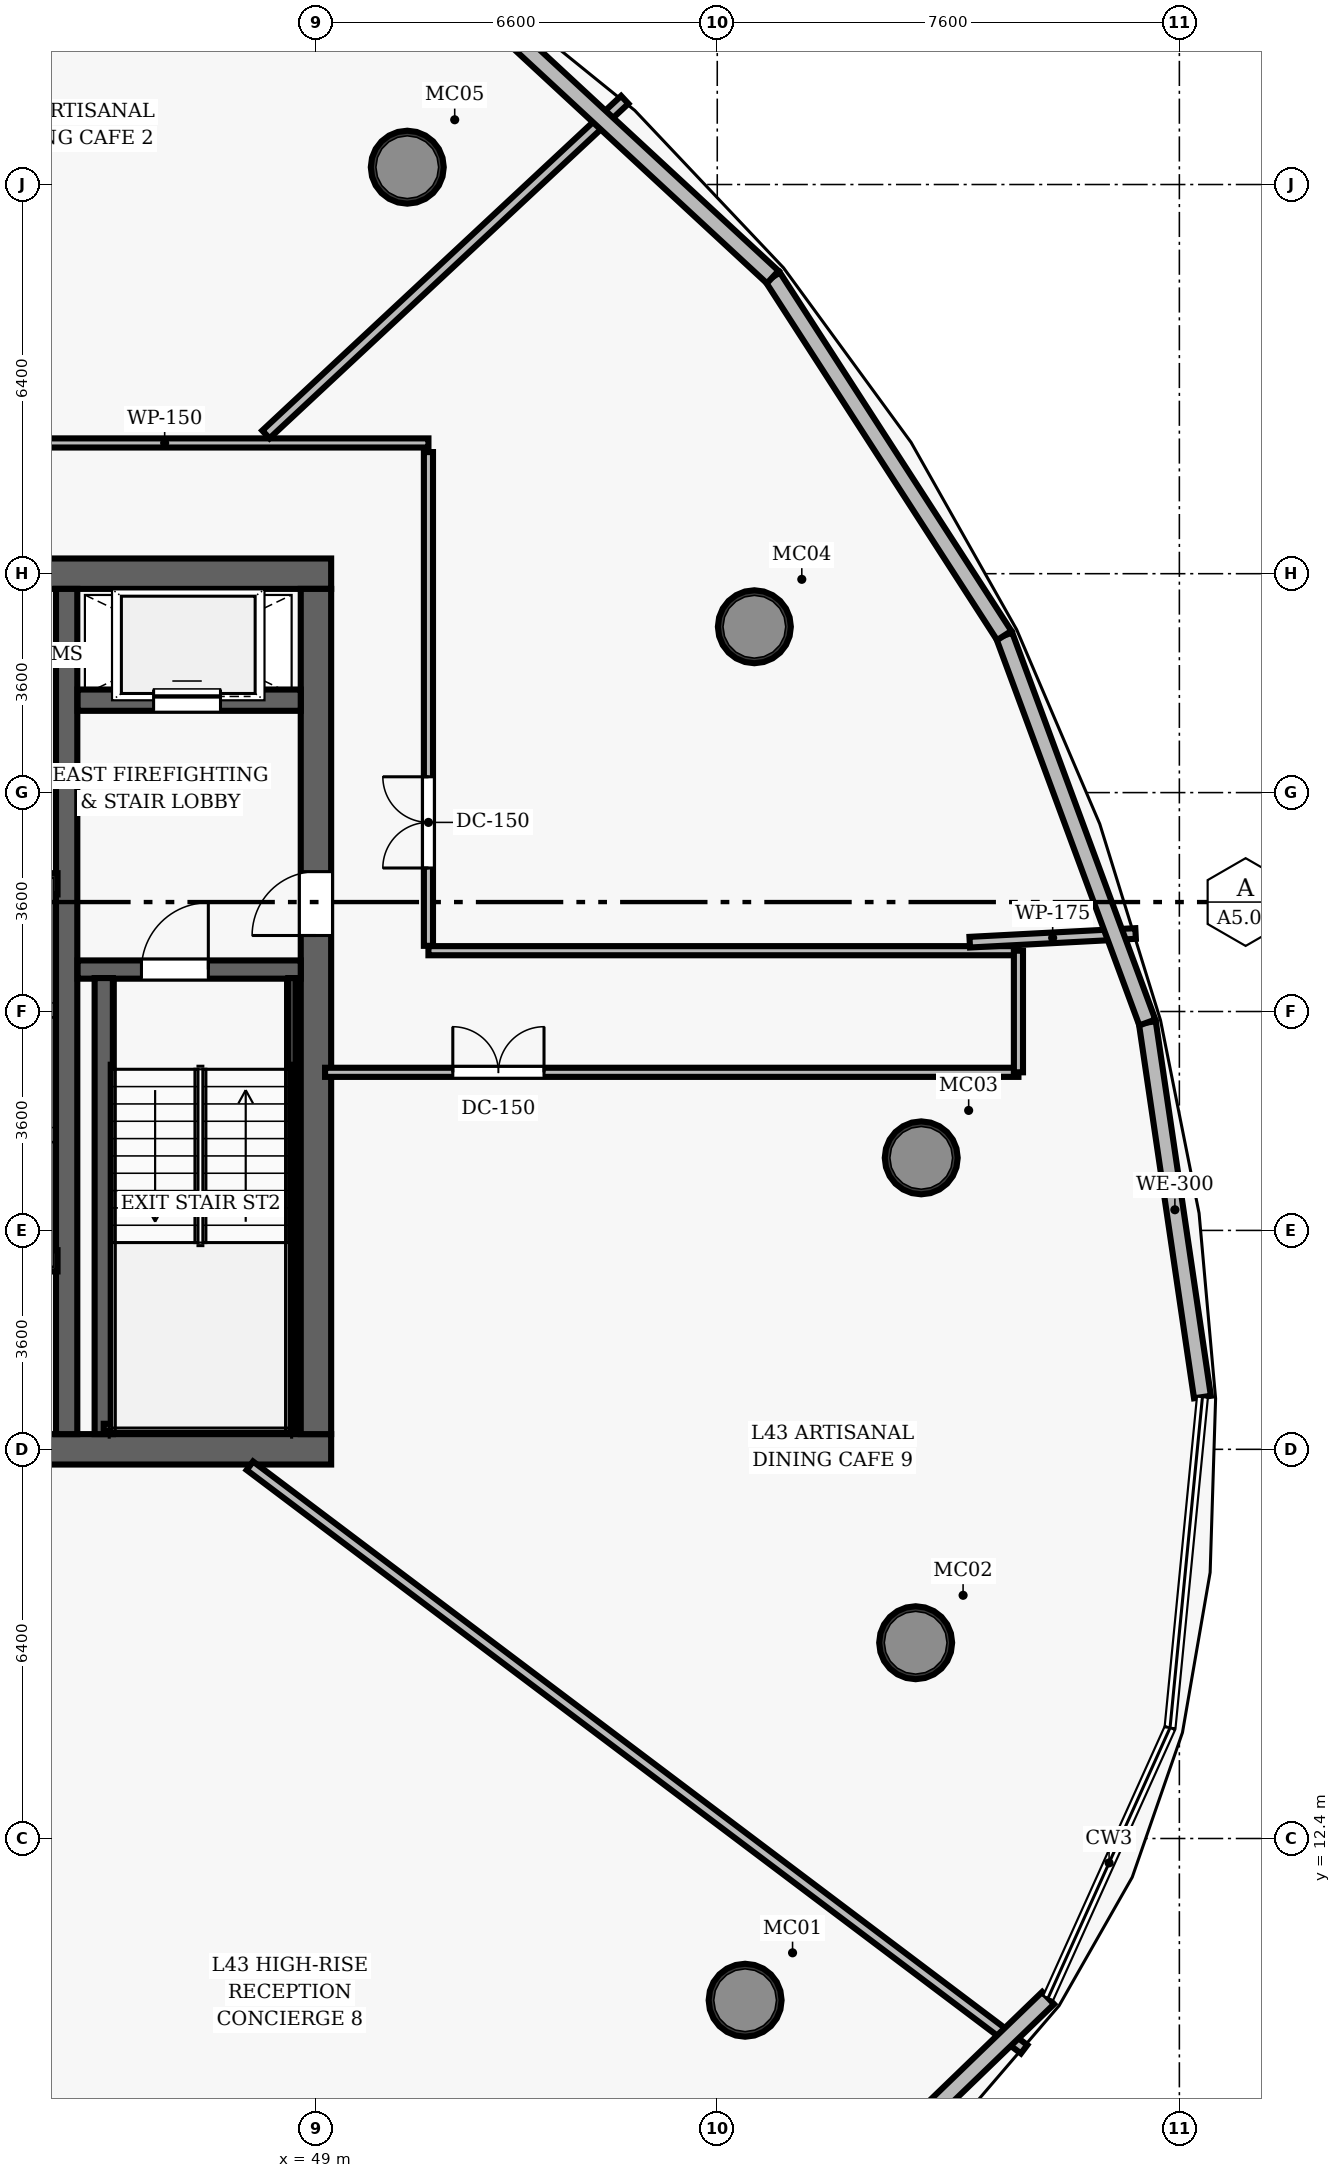
"""IFC4 building model, lengths in metres.
Left out: names, types, materials, properties, quantities, classifications, styles, units other than length and angle.
Written with IfcOpenShell. Run it as: python <this file> out.ifc"""

import sys

from ifc_helpers import new_model, si_unit, direction, frame, frame_2d, origin, origin_2d, place, context, subcontext, project, spatial, rectangle, hollow_circle, extrude, element, fill, save


model = new_model("IFC4")
c1 = context("Model", 3, precision=1e-05, world=origin(), true_north=direction((0.0, 1.0)))
c2 = subcontext(c1, "Body", "Model", "MODEL_VIEW")
j1 = project(units=[si_unit("LENGTHUNIT", "METRE"), si_unit("PLANEANGLEUNIT", "RADIAN")], contexts=[c1])
p1 = place(None, origin())
s1 = spatial("IfcSite", under=j1, at=p1, CompositionType="ELEMENT")
p2 = place(p1, origin())
s2 = spatial("IfcBuilding", under=s1, at=p2, CompositionType="ELEMENT")
p3 = place(p2, frame((0.0, 0.0, 171.2)))
s3 = spatial("IfcBuildingStorey", under=s2, at=p3, CompositionType="ELEMENT", Elevation=171.2)
p4 = place(p3, frame((26.75, 18.8, 0.0), z_axis=(0.0, 0.0, 1.0), x_axis=(1.0, 0.0, 0.0)))
e1 = element("IfcWall", 1, at=p4, inside=s3, PredefinedType="SHEAR", context=c2, shape_type="SweptSolid", body=[
    extrude(rectangle(XDim=22.5, YDim=0.5, at=frame_2d((11.25, 0.0))), origin(), (0.0, 0.0, 1.0), 3.85),
])
p5 = place(p4, frame((14.47, 0.0, 0.0)))
e2 = element("IfcOpeningElement", 2, at=p5, cuts=e1, PredefinedType="OPENING", context=c2, shape_type="SweptSolid", body=[
    extrude(rectangle(XDim=1.05, YDim=2.15, at=frame_2d((0.525, 1.075))), frame((0.0, 0.26, 0.0), z_axis=(0.0, -1.0, 0.0), x_axis=(1.0, 0.0, 0.0)), (0.0, 0.0, 1.0), 0.52),
])
p6 = place(p3, frame((26.75, 33.2, 0.0), z_axis=(0.0, 0.0, 1.0), x_axis=(1.0, 0.0, 0.0)))
e3 = element("IfcWall", 3, at=p6, inside=s3, PredefinedType="SHEAR", context=c2, shape_type="SweptSolid", body=[
    extrude(rectangle(XDim=22.5, YDim=0.5, at=frame_2d((11.25, 0.0))), origin(), (0.0, 0.0, 1.0), 3.85),
])
p7 = place(p6, frame((4.57, 0.0, 0.0)))
e4 = element("IfcOpeningElement", 4, at=p7, cuts=e3, PredefinedType="OPENING", context=c2, shape_type="SweptSolid", body=[
    extrude(rectangle(XDim=1.05, YDim=2.15, at=frame_2d((0.525, 1.075))), frame((0.0, 0.26, 0.0), z_axis=(0.0, -1.0, 0.0), x_axis=(1.0, 0.0, 0.0)), (0.0, 0.0, 1.0), 0.52),
])
p8 = place(p6, frame((14.47, 0.0, 0.0)))
e5 = element("IfcOpeningElement", 5, at=p8, cuts=e3, PredefinedType="OPENING", context=c2, shape_type="SweptSolid", body=[
    extrude(rectangle(XDim=1.05, YDim=2.15, at=frame_2d((0.525, 1.075))), frame((0.0, 0.26, 0.0), z_axis=(0.0, -1.0, 0.0), x_axis=(1.0, 0.0, 0.0)), (0.0, 0.0, 1.0), 0.52),
])
p9 = place(p3, frame((49.0, 19.05, 0.0), z_axis=(0.0, 0.0, 1.0), x_axis=(0.0, 1.0, 0.0)))
e6 = element("IfcWall", 6, at=p9, inside=s3, PredefinedType="SHEAR", context=c2, shape_type="SweptSolid", body=[
    extrude(rectangle(XDim=13.9, YDim=0.5, at=frame_2d((6.95, 0.0))), origin(), (0.0, 0.0, 1.0), 3.85),
])
p10 = place(p9, frame((8.2, 0.0, 0.0)))
e7 = element("IfcOpeningElement", 7, at=p10, cuts=e6, PredefinedType="OPENING", context=c2, shape_type="SweptSolid", body=[
    extrude(rectangle(XDim=1.05, YDim=2.15, at=frame_2d((0.525, 1.075))), frame((0.0, 0.26, 0.0), z_axis=(0.0, -1.0, 0.0), x_axis=(1.0, 0.0, 0.0)), (0.0, 0.0, 1.0), 0.52),
])
p11 = place(p3, frame((44.9, 19.05, 0.0), z_axis=(0.0, 0.0, 1.0), x_axis=(0.0, 1.0, 0.0)))
e8 = element("IfcWall", 8, at=p11, inside=s3, PredefinedType="SHEAR", context=c2, shape_type="SweptSolid", body=[
    extrude(rectangle(XDim=13.9, YDim=0.35, at=frame_2d((6.95, 0.0))), origin(), (0.0, 0.0, 1.0), 3.85),
])
for number, where, z_axis, x_axis in (
    (9, (56.058, 9.74, 0.0), (0.0, 0.0, 1.0), (1.0, 0.0, 0.0)),
    (10, (58.863, 15.619, 0.0), (0.0, 0.0, 1.0), (1.0, 0.0, 0.0)),
    (11, (58.955, 23.594, 0.0), (0.0, 0.0, 1.0), (1.0, 0.0, 0.0)),
    (12, (56.21, 32.327, 0.0), (0.0, 0.0, 1.0), (1.0, 0.0, 0.0)),
    (13, (50.502, 39.885, 0.0), (0.0, 0.0, 1.0), (1.0, 0.0, 0.0)),
):
    element("IfcColumn", number, at=place(p3, frame(where, z_axis=z_axis, x_axis=x_axis)), inside=s3, PredefinedType="COLUMN", context=c2, shape_type="SweptSolid", body=[
        extrude(hollow_circle(Radius=0.6, WallThickness=0.05, at=origin_2d()), origin(), (0.0, 0.0, 1.0), 3.85),
    ])
p12 = place(p3, frame((45.08, 26.69, 0.0), z_axis=(0.0, 0.0, 1.0), x_axis=(1.0, 0.0, 0.0)))
e14 = element("IfcWall", 14, at=p12, inside=s3, PredefinedType="SHEAR", context=c2, shape_type="SweptSolid", body=[
    extrude(rectangle(XDim=3.67, YDim=0.3, at=frame_2d((1.835, 0.0))), origin(), (0.0, 0.0, 1.0), 3.85),
])
p13 = place(p12, frame((1.05, 0.0, 0.0)))
e15 = element("IfcOpeningElement", 15, at=p13, cuts=e14, PredefinedType="OPENING", context=c2, shape_type="SweptSolid", body=[
    extrude(rectangle(XDim=1.1, YDim=2.15, at=frame_2d((0.55, 1.075))), frame((0.0, 0.16, 0.0), z_axis=(0.0, -1.0, 0.0), x_axis=(1.0, 0.0, 0.0)), (0.0, 0.0, 1.0), 0.32),
])
p14 = place(p3, frame((45.51, 19.05, 0.0), z_axis=(0.0, 0.0, 1.0), x_axis=(0.0, 1.0, 0.0)))
e16 = element("IfcWall", 16, at=p14, inside=s3, PredefinedType="SHEAR", context=c2, shape_type="SweptSolid", body=[
    extrude(rectangle(XDim=7.5, YDim=0.3, at=frame_2d((3.75, 0.0))), origin(), (0.0, 0.0, 1.0), 3.85),
])
p15 = place(p3, frame((48.605, 19.1, 0.0), z_axis=(0.0, 0.0, 1.0), x_axis=(0.0, 1.0, 0.0)))
e17 = element("IfcWall", 17, at=p15, inside=s3, PredefinedType="SHEAR", context=c2, shape_type="SweptSolid", body=[
    extrude(rectangle(XDim=7.45, YDim=0.12, at=frame_2d((3.725, 0.0))), origin(), (0.0, 0.0, 1.0), 3.85),
])
p16 = place(p3, frame((45.51, 19.16, 0.0), z_axis=(0.0, 0.0, 1.0), x_axis=(1.0, 0.0, 0.0)))
e18 = element("IfcWall", 18, at=p16, inside=s3, PredefinedType="SHEAR", context=c2, shape_type="SweptSolid", body=[
    extrude(rectangle(XDim=3.095, YDim=0.12, at=frame_2d((1.547, 0.0))), origin(), (0.0, 0.0, 1.0), 3.85),
])
p17 = place(p3, frame((45.08, 31.12, 0.0), z_axis=(0.0, 0.0, 1.0), x_axis=(1.0, 0.0, 0.0)))
e19 = element("IfcWall", 19, at=p17, inside=s3, PredefinedType="SHEAR", context=c2, shape_type="SweptSolid", body=[
    extrude(rectangle(XDim=3.67, YDim=0.35, at=frame_2d((1.835, 0.0))), origin(), (0.0, 0.0, 1.0), 3.035),
])
p18 = place(p17, frame((1.25, 0.0, 0.0)))
e20 = element("IfcOpeningElement", 20, at=p18, cuts=e19, PredefinedType="OPENING", context=c2, shape_type="SweptSolid", body=[
    extrude(rectangle(XDim=1.1, YDim=2.15, at=frame_2d((0.55, 1.075))), frame((0.0, 0.185, 0.0), z_axis=(0.0, -1.0, 0.0), x_axis=(1.0, 0.0, 0.0)), (0.0, 0.0, 1.0), 0.37),
])
for number, where, z_axis, x_axis in (
    (21, (42.72, 21.9, 0.0), (0.0, 0.0, 1.0), (1.0, 0.0, 0.0)),
    (22, (42.72, 28.1, 0.0), (0.0, 0.0, 1.0), (1.0, 0.0, 0.0)),
):
    element("IfcWall", number, at=place(p3, frame(where, z_axis=z_axis, x_axis=x_axis)), inside=s3, PredefinedType="SHEAR", context=c2, shape_type="SweptSolid", body=[
        extrude(rectangle(XDim=2.03, YDim=0.35, at=frame_2d((1.015, 0.0))), origin(), (0.0, 0.0, 1.0), 3.035),
    ])
p19 = place(p3, frame((24.85, 35.35, 0.0), z_axis=(0.0, 0.0, 1.0), x_axis=(1.0, 0.0, 0.0)))
e23 = element("IfcWall", 23, at=p19, inside=s3, PredefinedType="PARTITIONING", context=c2, shape_type="SweptSolid", body=[
    extrude(rectangle(XDim=26.0, YDim=0.15, at=frame_2d((13.0, 0.0))), origin(), (0.0, 0.0, 1.0), 3.035),
])
p20 = place(p19, frame((15.674, 0.0, 0.0)))
e24 = element("IfcOpeningElement", 24, at=p20, cuts=e23, PredefinedType="OPENING", context=c2, shape_type="SweptSolid", body=[
    extrude(rectangle(XDim=1.5, YDim=2.2, at=frame_2d((0.75, 1.1))), frame((0.0, 0.085, 0.0), z_axis=(0.0, -1.0, 0.0), x_axis=(1.0, 0.0, 0.0)), (0.0, 0.0, 1.0), 0.17),
])
p21 = place(p19, frame((10.178, 0.0, 0.0)))
e25 = element("IfcOpeningElement", 25, at=p21, cuts=e23, PredefinedType="OPENING", context=c2, shape_type="SweptSolid", body=[
    extrude(rectangle(XDim=0.95, YDim=2.15, at=frame_2d((0.475, 1.075))), frame((0.0, 0.085, 0.0), z_axis=(0.0, -1.0, 0.0), x_axis=(1.0, 0.0, 0.0)), (0.0, 0.0, 1.0), 0.17),
])
p22 = place(p19, frame((4.997, 0.0, 0.0)))
e26 = element("IfcOpeningElement", 26, at=p22, cuts=e23, PredefinedType="OPENING", context=c2, shape_type="SweptSolid", body=[
    extrude(rectangle(XDim=0.95, YDim=2.15, at=frame_2d((0.475, 1.075))), frame((0.0, 0.085, 0.0), z_axis=(0.0, -1.0, 0.0), x_axis=(1.0, 0.0, 0.0)), (0.0, 0.0, 1.0), 0.17),
])
p23 = place(p3, frame((50.85, 27.08, 0.0), z_axis=(0.0, 0.0, 1.0), x_axis=(0.0, 1.0, 0.0)))
e27 = element("IfcWall", 27, at=p23, inside=s3, PredefinedType="PARTITIONING", context=c2, shape_type="SweptSolid", body=[
    extrude(rectangle(XDim=8.12, YDim=0.15, at=frame_2d((4.06, 0.0))), origin(), (0.0, 0.0, 1.0), 3.035),
])
p24 = place(p23, frame((1.28, 0.0, 0.0)))
e28 = element("IfcOpeningElement", 28, at=p24, cuts=e27, PredefinedType="OPENING", context=c2, shape_type="SweptSolid", body=[
    extrude(rectangle(XDim=1.5, YDim=2.2, at=frame_2d((0.75, 1.1))), frame((0.0, 0.085, 0.0), z_axis=(0.0, -1.0, 0.0), x_axis=(1.0, 0.0, 0.0)), (0.0, 0.0, 1.0), 0.17),
])
p25 = place(p3, frame((50.85, 27.0, 0.0), z_axis=(0.0, 0.0, 1.0), x_axis=(1.0, 0.0, 0.0)))
e29 = element("IfcWall", 29, at=p25, inside=s3, PredefinedType="PARTITIONING", context=c2, shape_type="SweptSolid", body=[
    extrude(rectangle(XDim=9.703, YDim=0.15, at=frame_2d((4.852, 0.0))), origin(), (0.0, 0.0, 1.0), 3.035),
])
p26 = place(p3, frame((49.15, 25.0, 0.0), z_axis=(0.0, 0.0, 1.0), x_axis=(1.0, 0.0, 0.0)))
e30 = element("IfcWall", 30, at=p26, inside=s3, PredefinedType="PARTITIONING", context=c2, shape_type="SweptSolid", body=[
    extrude(rectangle(XDim=11.403, YDim=0.15, at=frame_2d((5.702, 0.0))), origin(), (0.0, 0.0, 1.0), 3.035),
])
p27 = place(p26, frame((2.101, 0.0, 0.0)))
e31 = element("IfcOpeningElement", 31, at=p27, cuts=e30, PredefinedType="OPENING", context=c2, shape_type="SweptSolid", body=[
    extrude(rectangle(XDim=1.5, YDim=2.2, at=frame_2d((0.75, 1.1))), frame((0.0, 0.085, 0.0), z_axis=(0.0, -1.0, 0.0), x_axis=(1.0, 0.0, 0.0)), (0.0, 0.0, 1.0), 0.17),
])
p28 = place(p3, frame((60.553, 25.0, 0.0), z_axis=(0.0, 0.0, 1.0), x_axis=(0.0, 1.0, 0.0)))
e32 = element("IfcWall", 32, at=p28, inside=s3, PredefinedType="PARTITIONING", context=c2, shape_type="SweptSolid", body=[
    extrude(rectangle(XDim=2.0, YDim=0.15, at=frame_2d((1.0, 0.0))), origin(), (0.0, 0.0, 1.0), 3.035),
])
p29 = place(p3, frame((59.752, 27.14, 0.0), z_axis=(0.0, 0.0, 1.0), x_axis=(0.998627196543, 0.052380552916, 0.0)))
e33 = element("IfcWall", 33, at=p29, inside=s3, PredefinedType="PARTITIONING", context=c2, shape_type="SweptSolid", body=[
    extrude(rectangle(XDim=2.731, YDim=0.175, at=frame_2d((1.366, 0.0))), origin(), (0.0, 0.0, 1.0), 3.035),
])
p30 = place(p3, frame((48.177, 35.49, 0.0), z_axis=(0.0, 0.0, 1.0), x_axis=(0.731363052837, 0.681988331971, 0.0)))
e34 = element("IfcWall", 34, at=p30, inside=s3, PredefinedType="PARTITIONING", context=c2, shape_type="SweptSolid", body=[
    extrude(rectangle(XDim=8.07, YDim=0.175, at=frame_2d((4.035, 0.0))), origin(), (0.0, 0.0, 1.0), 3.035),
])
p31 = place(p3, frame((47.913, 18.53, 0.0), z_axis=(0.0, 0.0, 1.0), x_axis=(0.798636382818, -0.601813864944, 0.0)))
e35 = element("IfcWall", 35, at=p31, inside=s3, PredefinedType="PARTITIONING", context=c2, shape_type="SweptSolid", body=[
    extrude(rectangle(XDim=15.944, YDim=0.175, at=frame_2d((7.972, 0.0))), origin(), (0.0, 0.0, 1.0), 3.035),
])
p32 = place(p3, frame((62.673, 25.82, 0.0), z_axis=(0.0, 0.0, 1.0), x_axis=(0.145592201072, -0.989344687653, 0.0)))
e36 = element("IfcWall", 36, at=p32, inside=s3, PredefinedType="SOLIDWALL", context=c2, shape_type="SweptSolid", body=[
    extrude(rectangle(XDim=6.226, YDim=0.28, at=frame_2d((3.113, 0.0))), origin(), (0.0, 0.0, 1.0), 3.62),
])
p33 = place(p3, frame((60.32, 32.183, 0.0), z_axis=(0.0, 0.0, 1.0), x_axis=(0.346892401277, -0.937904932249, 0.0)))
e37 = element("IfcWall", 37, at=p33, inside=s3, PredefinedType="SOLIDWALL", context=c2, shape_type="SweptSolid", body=[
    extrude(rectangle(XDim=6.785, YDim=0.28, at=frame_2d((3.392, 0.0))), origin(), (0.0, 0.0, 1.0), 3.62),
])
p34 = place(p3, frame((56.512, 38.078, 0.0), z_axis=(0.0, 0.0, 1.0), x_axis=(0.542583225107, -0.840002049898, 0.0)))
e38 = element("IfcWall", 38, at=p34, inside=s3, PredefinedType="SOLIDWALL", context=c2, shape_type="SweptSolid", body=[
    extrude(rectangle(XDim=7.018, YDim=0.28, at=frame_2d((3.509, 0.0))), origin(), (0.0, 0.0, 1.0), 3.62),
])
p35 = place(p3, frame((51.342, 42.865, 0.0), z_axis=(0.0, 0.0, 1.0), x_axis=(0.733767711646, -0.679400430782, 0.0)))
e39 = element("IfcWall", 39, at=p35, inside=s3, PredefinedType="SOLIDWALL", context=c2, shape_type="SweptSolid", body=[
    extrude(rectangle(XDim=7.046, YDim=0.28, at=frame_2d((3.523, 0.0))), origin(), (0.0, 0.0, 1.0), 3.62),
])
p36 = place(p3, frame((61.041, 9.776, 0.0), z_axis=(0.0, 0.0, 1.0), x_axis=(-0.719537756964, -0.694453321904, 0.0)))
e40 = element("IfcWall", 40, at=p36, inside=s3, PredefinedType="SOLIDWALL", context=c2, shape_type="SweptSolid", body=[
    extrude(rectangle(XDim=4.876, YDim=0.28, at=frame_2d((2.438, 0.0))), origin(), (0.0, 0.0, 1.0), 3.62),
])
p37 = place(p13, origin())
e41 = element("IfcDoor", 41, at=p37, inside=s3, OperationType="SINGLE_SWING_RIGHT", PredefinedType="DOOR", context=c2, shape_type="SweptSolid", body=[
    extrude(rectangle(XDim=1.1, YDim=2.15, at=frame_2d((0.55, 1.075))), frame((0.0, 0.025, 0.0), z_axis=(0.0, -1.0, 0.0), x_axis=(1.0, 0.0, 0.0)), (0.0, 0.0, 1.0), 0.05),
])
fill(e15, e41)
p38 = place(p10, origin())
e42 = element("IfcDoor", 42, at=p38, inside=s3, OperationType="SINGLE_SWING_LEFT", PredefinedType="DOOR", context=c2, shape_type="SweptSolid", body=[
    extrude(rectangle(XDim=1.05, YDim=2.15, at=frame_2d((0.525, 1.075))), frame((0.0, 0.025, 0.0), z_axis=(0.0, -1.0, 0.0), x_axis=(1.0, 0.0, 0.0)), (0.0, 0.0, 1.0), 0.05),
])
fill(e7, e42)
p39 = place(p24, origin())
e43 = element("IfcDoor", 43, at=p39, inside=s3, OperationType="DOUBLE_DOOR_SINGLE_SWING", PredefinedType="DOOR", context=c2, shape_type="SweptSolid", body=[
    extrude(rectangle(XDim=1.5, YDim=2.2, at=frame_2d((0.75, 1.1))), frame((0.0, 0.025, 0.0), z_axis=(0.0, -1.0, 0.0), x_axis=(1.0, 0.0, 0.0)), (0.0, 0.0, 1.0), 0.05),
])
fill(e28, e43)
p40 = place(p27, origin())
e44 = element("IfcDoor", 44, at=p40, inside=s3, OperationType="DOUBLE_DOOR_SINGLE_SWING", PredefinedType="DOOR", context=c2, shape_type="SweptSolid", body=[
    extrude(rectangle(XDim=1.5, YDim=2.2, at=frame_2d((0.75, 1.1))), frame((0.0, 0.025, 0.0), z_axis=(0.0, -1.0, 0.0), x_axis=(1.0, 0.0, 0.0)), (0.0, 0.0, 1.0), 0.05),
])
fill(e31, e44)
p41 = place(p18, origin())
e45 = element("IfcDoor", 45, at=p41, inside=s3, OperationType="SLIDING_TO_LEFT", PredefinedType="DOOR", context=c2, shape_type="SweptSolid", body=[
    extrude(rectangle(XDim=1.1, YDim=2.15, at=frame_2d((0.55, 1.075))), frame((0.0, 0.025, 0.0), z_axis=(0.0, -1.0, 0.0), x_axis=(1.0, 0.0, 0.0)), (0.0, 0.0, 1.0), 0.05),
])
fill(e20, e45)
save(model, sys.argv[1])
